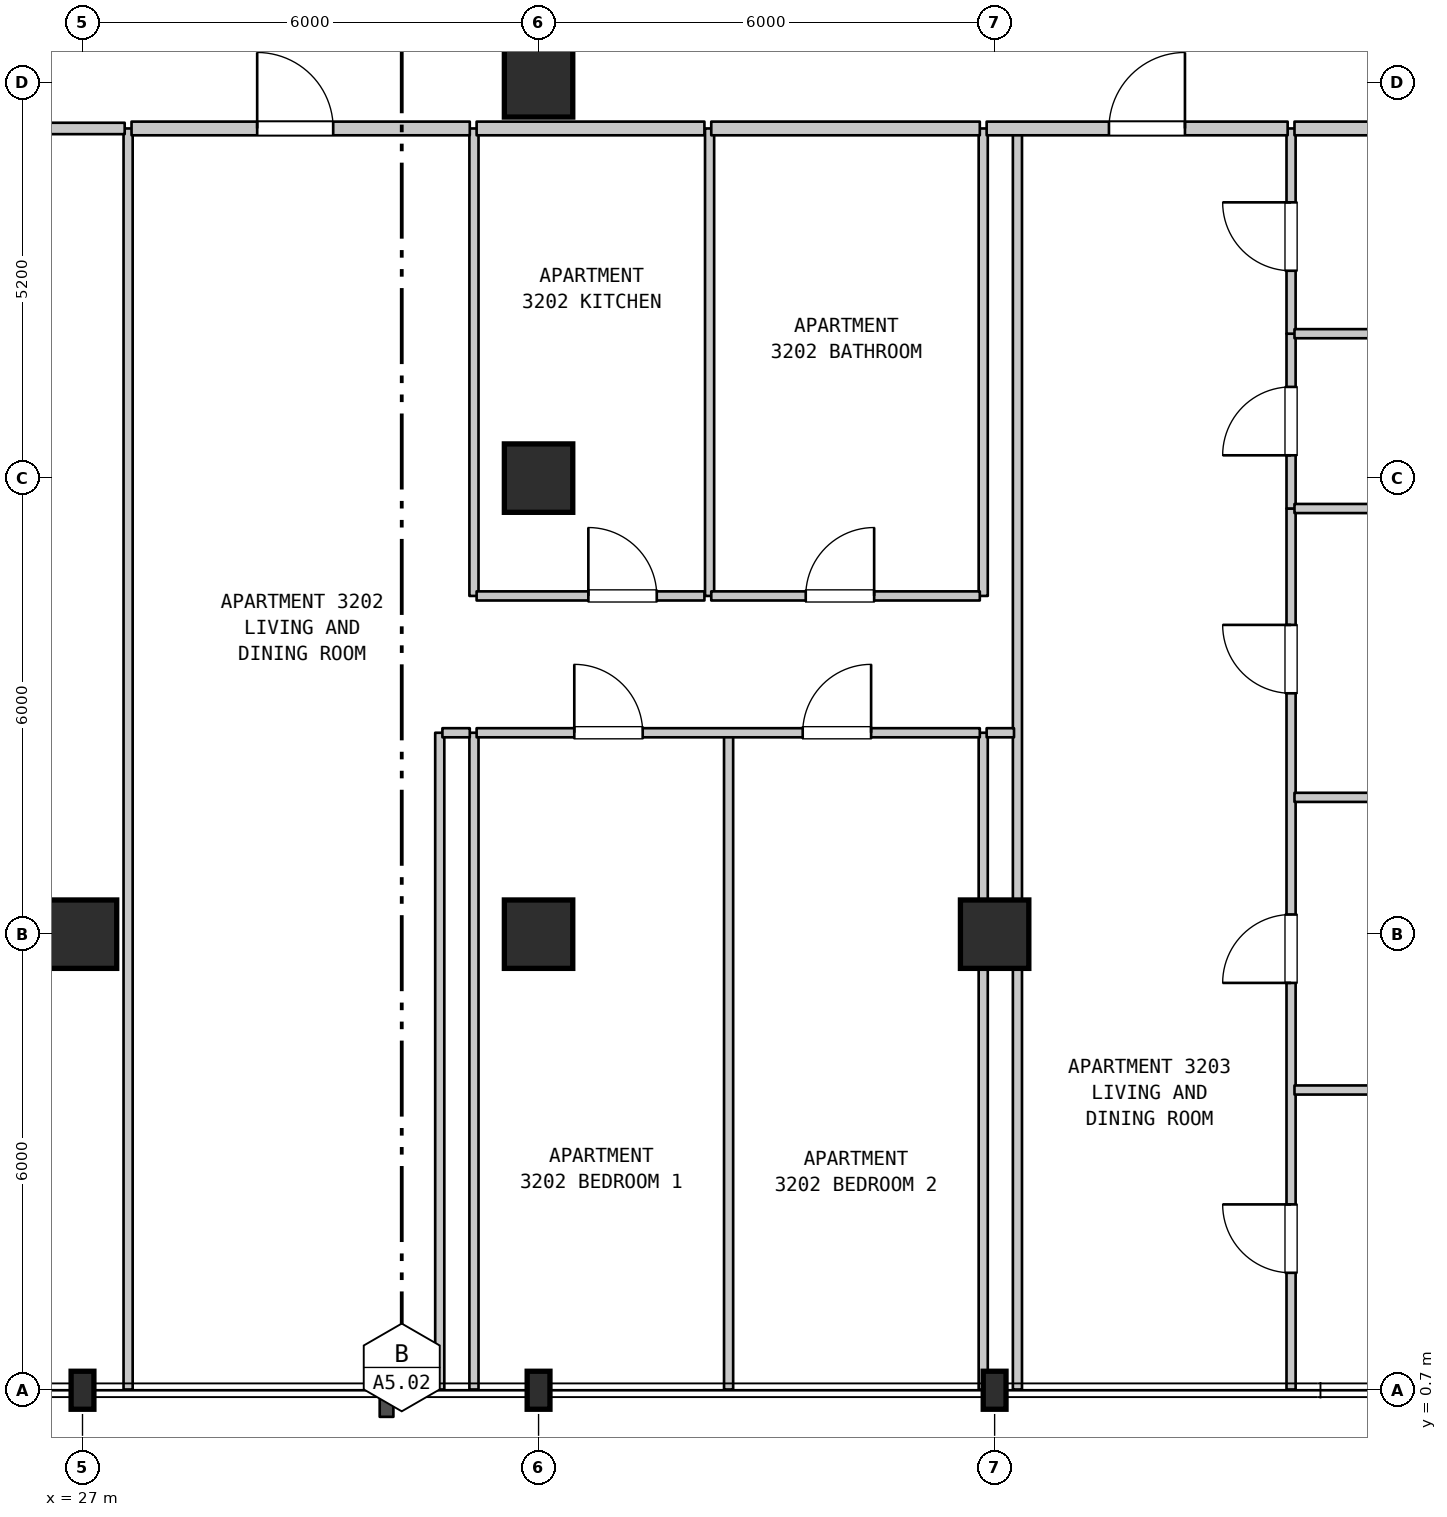
"""IFC4 building model, lengths in metres.
Left out: names, types, materials, properties, quantities, classifications, styles, units other than length and angle.
Written with IfcOpenShell. Run it as: python <this file> out.ifc"""

import sys

from ifc_helpers import new_model, si_unit, direction, frame, frame_2d, origin, origin_2d, place, context, subcontext, project, spatial, rectangle, i_section, extrude, element, fill, save


model = new_model("IFC4")
c1 = context("Model", 3, precision=1e-05, world=origin(), true_north=direction((0.0, 1.0)))
c2 = subcontext(c1, "Body", "Model", "MODEL_VIEW")
j1 = project(units=[si_unit("LENGTHUNIT", "METRE"), si_unit("PLANEANGLEUNIT", "RADIAN")], contexts=[c1])
p1 = place(None, origin())
s1 = spatial("IfcSite", under=j1, at=p1, CompositionType="ELEMENT")
p2 = place(p1, origin())
s2 = spatial("IfcBuilding", under=s1, at=p2, CompositionType="ELEMENT")
p3 = place(p2, frame((0.0, 0.0, 133.5)))
s3 = spatial("IfcBuildingStorey", under=s2, at=p3, CompositionType="ELEMENT", Elevation=133.5)
p4 = place(p3, frame((27.0, 0.7, 0.0), z_axis=(0.0, 0.0, 1.0), x_axis=(1.0, 0.0, 0.0)))
e1 = element("IfcColumn", 1, at=p4, inside=s3, PredefinedType="COLUMN", context=c2, shape_type="SweptSolid", body=[
    extrude(i_section(OverallWidth=0.3, OverallDepth=0.5, WebThickness=0.014, FlangeThickness=0.028, FilletRadius=0.027, at=origin_2d()), origin(), (0.0, 0.0, 1.0), 3.7),
])
p5 = place(p3, frame((27.0, 6.7, 0.0), z_axis=(0.0, 0.0, 1.0), x_axis=(1.0, 0.0, 0.0)))
e2 = element("IfcColumn", 2, at=p5, inside=s3, PredefinedType="COLUMN", context=c2, shape_type="SweptSolid", body=[
    extrude(rectangle(XDim=0.9, YDim=0.9, at=origin_2d()), origin(), (0.0, 0.0, 1.0), 3.7),
])
p6 = place(p3, frame((33.0, 0.7, 0.0), z_axis=(0.0, 0.0, 1.0), x_axis=(1.0, 0.0, 0.0)))
e3 = element("IfcColumn", 3, at=p6, inside=s3, PredefinedType="COLUMN", context=c2, shape_type="SweptSolid", body=[
    extrude(i_section(OverallWidth=0.3, OverallDepth=0.5, WebThickness=0.014, FlangeThickness=0.028, FilletRadius=0.027, at=origin_2d()), origin(), (0.0, 0.0, 1.0), 3.7),
])
for number, where, z_axis, x_axis in (
    (4, (33.0, 6.7, 0.0), (0.0, 0.0, 1.0), (1.0, 0.0, 0.0)),
    (5, (33.0, 12.7, 0.0), (0.0, 0.0, 1.0), (1.0, 0.0, 0.0)),
    (6, (33.0, 17.9, 0.0), (0.0, 0.0, 1.0), (1.0, 0.0, 0.0)),
):
    element("IfcColumn", number, at=place(p3, frame(where, z_axis=z_axis, x_axis=x_axis)), inside=s3, PredefinedType="COLUMN", context=c2, shape_type="SweptSolid", body=[
        extrude(rectangle(XDim=0.9, YDim=0.9, at=origin_2d()), origin(), (0.0, 0.0, 1.0), 3.7),
    ])
p7 = place(p3, frame((39.0, 0.7, 0.0), z_axis=(0.0, 0.0, 1.0), x_axis=(1.0, 0.0, 0.0)))
e7 = element("IfcColumn", 7, at=p7, inside=s3, PredefinedType="COLUMN", context=c2, shape_type="SweptSolid", body=[
    extrude(i_section(OverallWidth=0.3, OverallDepth=0.5, WebThickness=0.014, FlangeThickness=0.028, FilletRadius=0.027, at=origin_2d()), origin(), (0.0, 0.0, 1.0), 3.7),
])
p8 = place(p3, frame((39.0, 6.7, 0.0), z_axis=(0.0, 0.0, 1.0), x_axis=(1.0, 0.0, 0.0)))
e8 = element("IfcColumn", 8, at=p8, inside=s3, PredefinedType="COLUMN", context=c2, shape_type="SweptSolid", body=[
    extrude(rectangle(XDim=0.9, YDim=0.9, at=origin_2d()), origin(), (0.0, 0.0, 1.0), 3.7),
])
p9 = place(p3, frame((27.6, 0.71, 0.0), z_axis=(0.0, 0.0, 1.0), x_axis=(0.0, 1.0, 0.0)))
e9 = element("IfcWall", 9, at=p9, inside=s3, PredefinedType="PARTITIONING", context=c2, shape_type="SweptSolid", body=[
    extrude(rectangle(XDim=16.59, YDim=0.12, at=frame_2d((8.295, 0.0))), origin(), (0.0, 0.0, 1.0), 3.385),
])
for number, where, z_axis, x_axis in (
    (10, (31.7, 0.71, 0.0), (0.0, 0.0, 1.0), (0.0, 1.0, 0.0)),
    (11, (32.15, 0.71, 0.0), (0.0, 0.0, 1.0), (0.0, 1.0, 0.0)),
):
    element("IfcWall", number, at=place(p3, frame(where, z_axis=z_axis, x_axis=x_axis)), inside=s3, PredefinedType="PARTITIONING", context=c2, shape_type="SweptSolid", body=[
        extrude(rectangle(XDim=8.64, YDim=0.12, at=frame_2d((4.32, 0.0))), origin(), (0.0, 0.0, 1.0), 3.385),
    ])
for number, where, z_axis, x_axis in (
    (12, (32.15, 11.15, 0.0), (0.0, 0.0, 1.0), (0.0, 1.0, 0.0)),
    (13, (35.25, 11.15, 0.0), (0.0, 0.0, 1.0), (0.0, 1.0, 0.0)),
):
    element("IfcWall", number, at=place(p3, frame(where, z_axis=z_axis, x_axis=x_axis)), inside=s3, PredefinedType="PARTITIONING", context=c2, shape_type="SweptSolid", body=[
        extrude(rectangle(XDim=6.15, YDim=0.12, at=frame_2d((3.075, 0.0))), origin(), (0.0, 0.0, 1.0), 3.385),
    ])
for number, where, z_axis, x_axis in (
    (14, (35.5, 0.71, 0.0), (0.0, 0.0, 1.0), (0.0, 1.0, 0.0)),
    (15, (38.85, 0.71, 0.0), (0.0, 0.0, 1.0), (0.0, 1.0, 0.0)),
):
    element("IfcWall", number, at=place(p3, frame(where, z_axis=z_axis, x_axis=x_axis)), inside=s3, PredefinedType="PARTITIONING", context=c2, shape_type="SweptSolid", body=[
        extrude(rectangle(XDim=8.64, YDim=0.12, at=frame_2d((4.32, 0.0))), origin(), (0.0, 0.0, 1.0), 3.385),
    ])
p10 = place(p3, frame((38.85, 11.15, 0.0), z_axis=(0.0, 0.0, 1.0), x_axis=(0.0, 1.0, 0.0)))
e16 = element("IfcWall", 16, at=p10, inside=s3, PredefinedType="PARTITIONING", context=c2, shape_type="SweptSolid", body=[
    extrude(rectangle(XDim=6.15, YDim=0.12, at=frame_2d((3.075, 0.0))), origin(), (0.0, 0.0, 1.0), 3.385),
])
p11 = place(p3, frame((39.3, 0.71, 0.0), z_axis=(0.0, 0.0, 1.0), x_axis=(0.0, 1.0, 0.0)))
e17 = element("IfcWall", 17, at=p11, inside=s3, PredefinedType="PARTITIONING", context=c2, shape_type="SweptSolid", body=[
    extrude(rectangle(XDim=16.59, YDim=0.12, at=frame_2d((8.295, 0.0))), origin(), (0.0, 0.0, 1.0), 3.385),
])
p12 = place(p3, frame((42.9, 0.71, 0.0), z_axis=(0.0, 0.0, 1.0), x_axis=(0.0, 1.0, 0.0)))
e18 = element("IfcWall", 18, at=p12, inside=s3, PredefinedType="PARTITIONING", context=c2, shape_type="SweptSolid", body=[
    extrude(rectangle(XDim=11.59, YDim=0.12, at=frame_2d((5.795, 0.0))), origin(), (0.0, 0.0, 1.0), 3.385),
])
p13 = place(p12, frame((1.535, 0.0, 0.0)))
e19 = element("IfcOpeningElement", 19, at=p13, cuts=e18, PredefinedType="OPENING", context=c2, shape_type="SweptSolid", body=[
    extrude(rectangle(XDim=0.9, YDim=2.15, at=frame_2d((0.45, 1.075))), frame((0.0, 0.07, 0.0), z_axis=(0.0, -1.0, 0.0), x_axis=(1.0, 0.0, 0.0)), (0.0, 0.0, 1.0), 0.14),
])
p14 = place(p12, frame((5.349, 0.0, 0.0)))
e20 = element("IfcOpeningElement", 20, at=p14, cuts=e18, PredefinedType="OPENING", context=c2, shape_type="SweptSolid", body=[
    extrude(rectangle(XDim=0.9, YDim=2.15, at=frame_2d((0.45, 1.075))), frame((0.0, 0.07, 0.0), z_axis=(0.0, -1.0, 0.0), x_axis=(1.0, 0.0, 0.0)), (0.0, 0.0, 1.0), 0.14),
])
p15 = place(p12, frame((9.159, 0.0, 0.0)))
e21 = element("IfcOpeningElement", 21, at=p15, cuts=e18, PredefinedType="OPENING", context=c2, shape_type="SweptSolid", body=[
    extrude(rectangle(XDim=0.9, YDim=2.15, at=frame_2d((0.45, 1.075))), frame((0.0, 0.07, 0.0), z_axis=(0.0, -1.0, 0.0), x_axis=(1.0, 0.0, 0.0)), (0.0, 0.0, 1.0), 0.14),
])
p16 = place(p3, frame((42.9, 12.3, 0.0), z_axis=(0.0, 0.0, 1.0), x_axis=(0.0, 1.0, 0.0)))
e22 = element("IfcWall", 22, at=p16, inside=s3, PredefinedType="PARTITIONING", context=c2, shape_type="SweptSolid", body=[
    extrude(rectangle(XDim=2.3, YDim=0.12, at=frame_2d((1.15, 0.0))), origin(), (0.0, 0.0, 1.0), 3.385),
])
p17 = place(p16, frame((0.7, 0.0, 0.0)))
e23 = element("IfcOpeningElement", 23, at=p17, cuts=e22, PredefinedType="OPENING", context=c2, shape_type="SweptSolid", body=[
    extrude(rectangle(XDim=0.9, YDim=2.15, at=frame_2d((0.45, 1.075))), frame((0.0, 0.07, 0.0), z_axis=(0.0, -1.0, 0.0), x_axis=(1.0, 0.0, 0.0)), (0.0, 0.0, 1.0), 0.14),
])
p18 = place(p3, frame((42.9, 14.6, 0.0), z_axis=(0.0, 0.0, 1.0), x_axis=(0.0, 1.0, 0.0)))
e24 = element("IfcWall", 24, at=p18, inside=s3, PredefinedType="PARTITIONING", context=c2, shape_type="SweptSolid", body=[
    extrude(rectangle(XDim=2.7, YDim=0.12, at=frame_2d((1.35, 0.0))), origin(), (0.0, 0.0, 1.0), 3.385),
])
p19 = place(p18, frame((0.828, 0.0, 0.0)))
e25 = element("IfcOpeningElement", 25, at=p19, cuts=e24, PredefinedType="OPENING", context=c2, shape_type="SweptSolid", body=[
    extrude(rectangle(XDim=0.9, YDim=2.1, at=frame_2d((0.45, 1.05))), frame((0.0, 0.07, 0.0), z_axis=(0.0, -1.0, 0.0), x_axis=(1.0, 0.0, 0.0)), (0.0, 0.0, 1.0), 0.14),
])
for number, where, z_axis, x_axis in (
    (26, (42.945, 4.65, 0.0), (0.0, 0.0, 1.0), (1.0, 0.0, 0.0)),
    (27, (42.945, 8.5, 0.0), (0.0, 0.0, 1.0), (1.0, 0.0, 0.0)),
):
    element("IfcWall", number, at=place(p3, frame(where, z_axis=z_axis, x_axis=x_axis)), inside=s3, PredefinedType="PARTITIONING", context=c2, shape_type="SweptSolid", body=[
        extrude(rectangle(XDim=6.25, YDim=0.12, at=frame_2d((3.125, 0.0))), origin(), (0.0, 0.0, 1.0), 3.385),
    ])
p20 = place(p3, frame((31.735, 9.35, 0.0), z_axis=(0.0, 0.0, 1.0), x_axis=(1.0, 0.0, 0.0)))
e28 = element("IfcWall", 28, at=p20, inside=s3, PredefinedType="PARTITIONING", context=c2, shape_type="SweptSolid", body=[
    extrude(rectangle(XDim=0.36, YDim=0.12, at=frame_2d((0.18, 0.0))), origin(), (0.0, 0.0, 1.0), 3.385),
])
p21 = place(p3, frame((32.185, 9.35, 0.0), z_axis=(0.0, 0.0, 1.0), x_axis=(1.0, 0.0, 0.0)))
e29 = element("IfcWall", 29, at=p21, inside=s3, PredefinedType="PARTITIONING", context=c2, shape_type="SweptSolid", body=[
    extrude(rectangle(XDim=6.62, YDim=0.12, at=frame_2d((3.31, 0.0))), origin(), (0.0, 0.0, 1.0), 3.385),
])
p22 = place(p21, frame((1.285, 0.0, 0.0)))
e30 = element("IfcOpeningElement", 30, at=p22, cuts=e29, PredefinedType="OPENING", context=c2, shape_type="SweptSolid", body=[
    extrude(rectangle(XDim=0.9, YDim=2.15, at=frame_2d((0.45, 1.075))), frame((0.0, 0.07, 0.0), z_axis=(0.0, -1.0, 0.0), x_axis=(1.0, 0.0, 0.0)), (0.0, 0.0, 1.0), 0.14),
])
p23 = place(p21, frame((4.29, 0.0, 0.0)))
e31 = element("IfcOpeningElement", 31, at=p23, cuts=e29, PredefinedType="OPENING", context=c2, shape_type="SweptSolid", body=[
    extrude(rectangle(XDim=0.9, YDim=2.15, at=frame_2d((0.45, 1.075))), frame((0.0, 0.07, 0.0), z_axis=(0.0, -1.0, 0.0), x_axis=(1.0, 0.0, 0.0)), (0.0, 0.0, 1.0), 0.14),
])
p24 = place(p3, frame((38.895, 9.35, 0.0), z_axis=(0.0, 0.0, 1.0), x_axis=(1.0, 0.0, 0.0)))
e32 = element("IfcWall", 32, at=p24, inside=s3, PredefinedType="PARTITIONING", context=c2, shape_type="SweptSolid", body=[
    extrude(rectangle(XDim=0.36, YDim=0.12, at=frame_2d((0.18, 0.0))), origin(), (0.0, 0.0, 1.0), 3.385),
])
p25 = place(p3, frame((32.185, 11.15, 0.0), z_axis=(0.0, 0.0, 1.0), x_axis=(1.0, 0.0, 0.0)))
e33 = element("IfcWall", 33, at=p25, inside=s3, PredefinedType="PARTITIONING", context=c2, shape_type="SweptSolid", body=[
    extrude(rectangle(XDim=2.997, YDim=0.12, at=frame_2d((1.499, 0.0))), origin(), (0.0, 0.0, 1.0), 3.385),
])
p26 = place(p25, frame((1.47, 0.0, 0.0)))
e34 = element("IfcOpeningElement", 34, at=p26, cuts=e33, PredefinedType="OPENING", context=c2, shape_type="SweptSolid", body=[
    extrude(rectangle(XDim=0.9, YDim=2.15, at=frame_2d((0.45, 1.075))), frame((0.0, 0.07, 0.0), z_axis=(0.0, -1.0, 0.0), x_axis=(1.0, 0.0, 0.0)), (0.0, 0.0, 1.0), 0.14),
])
p27 = place(p3, frame((35.272, 11.15, 0.0), z_axis=(0.0, 0.0, 1.0), x_axis=(1.0, 0.0, 0.0)))
e35 = element("IfcWall", 35, at=p27, inside=s3, PredefinedType="PARTITIONING", context=c2, shape_type="SweptSolid", body=[
    extrude(rectangle(XDim=3.533, YDim=0.12, at=frame_2d((1.767, 0.0))), origin(), (0.0, 0.0, 1.0), 3.385),
])
p28 = place(p27, frame((1.243, 0.0, 0.0)))
e36 = element("IfcOpeningElement", 36, at=p28, cuts=e35, PredefinedType="OPENING", context=c2, shape_type="SweptSolid", body=[
    extrude(rectangle(XDim=0.9, YDim=2.1, at=frame_2d((0.45, 1.05))), frame((0.0, 0.07, 0.0), z_axis=(0.0, -1.0, 0.0), x_axis=(1.0, 0.0, 0.0)), (0.0, 0.0, 1.0), 0.14),
])
for number, where, z_axis, x_axis in (
    (37, (42.945, 12.3, 0.0), (0.0, 0.0, 1.0), (1.0, 0.0, 0.0)),
    (38, (42.945, 14.6, 0.0), (0.0, 0.0, 1.0), (1.0, 0.0, 0.0)),
):
    element("IfcWall", number, at=place(p3, frame(where, z_axis=z_axis, x_axis=x_axis)), inside=s3, PredefinedType="PARTITIONING", context=c2, shape_type="SweptSolid", body=[
        extrude(rectangle(XDim=6.25, YDim=0.12, at=frame_2d((3.125, 0.0))), origin(), (0.0, 0.0, 1.0), 3.385),
    ])
p29 = place(p3, frame((21.045, 17.3, 0.0), z_axis=(0.0, 0.0, 1.0), x_axis=(1.0, 0.0, 0.0)))
e39 = element("IfcWall", 39, at=p29, inside=s3, PredefinedType="STANDARD", context=c2, shape_type="SweptSolid", body=[
    extrude(rectangle(XDim=6.51, YDim=0.15, at=frame_2d((3.255, 0.0))), origin(), (0.0, 0.0, 1.0), 3.385),
])
p30 = place(p29, frame((2.755, 0.0, 0.0)))
e40 = element("IfcOpeningElement", 40, at=p30, cuts=e39, PredefinedType="OPENING", context=c2, shape_type="SweptSolid", body=[
    extrude(rectangle(XDim=1.0, YDim=2.15, at=frame_2d((0.5, 1.075))), frame((0.0, 0.085, 0.0), z_axis=(0.0, -1.0, 0.0), x_axis=(1.0, 0.0, 0.0)), (0.0, 0.0, 1.0), 0.17),
])
p31 = place(p3, frame((27.645, 17.3, 0.0), z_axis=(0.0, 0.0, 1.0), x_axis=(1.0, 0.0, 0.0)))
e41 = element("IfcWall", 41, at=p31, inside=s3, PredefinedType="STANDARD", context=c2, shape_type="SweptSolid", body=[
    extrude(rectangle(XDim=4.45, YDim=0.18, at=frame_2d((2.225, 0.0))), origin(), (0.0, 0.0, 1.0), 3.385),
])
p32 = place(p31, frame((1.653, 0.0, 0.0)))
e42 = element("IfcOpeningElement", 42, at=p32, cuts=e41, PredefinedType="OPENING", context=c2, shape_type="SweptSolid", body=[
    extrude(rectangle(XDim=1.0, YDim=2.15, at=frame_2d((0.5, 1.075))), frame((0.0, 0.1, 0.0), z_axis=(0.0, -1.0, 0.0), x_axis=(1.0, 0.0, 0.0)), (0.0, 0.0, 1.0), 0.2),
])
p33 = place(p3, frame((32.185, 17.3, 0.0), z_axis=(0.0, 0.0, 1.0), x_axis=(1.0, 0.0, 0.0)))
e43 = element("IfcWall", 43, at=p33, inside=s3, PredefinedType="STANDARD", context=c2, shape_type="SweptSolid", body=[
    extrude(rectangle(XDim=2.997, YDim=0.18, at=frame_2d((1.499, 0.0))), origin(), (0.0, 0.0, 1.0), 3.385),
])
p34 = place(p3, frame((35.272, 17.3, 0.0), z_axis=(0.0, 0.0, 1.0), x_axis=(1.0, 0.0, 0.0)))
e44 = element("IfcWall", 44, at=p34, inside=s3, PredefinedType="STANDARD", context=c2, shape_type="SweptSolid", body=[
    extrude(rectangle(XDim=3.533, YDim=0.18, at=frame_2d((1.767, 0.0))), origin(), (0.0, 0.0, 1.0), 3.385),
])
p35 = place(p3, frame((38.895, 17.3, 0.0), z_axis=(0.0, 0.0, 1.0), x_axis=(1.0, 0.0, 0.0)))
e45 = element("IfcWall", 45, at=p35, inside=s3, PredefinedType="STANDARD", context=c2, shape_type="SweptSolid", body=[
    extrude(rectangle(XDim=3.96, YDim=0.18, at=frame_2d((1.98, 0.0))), origin(), (0.0, 0.0, 1.0), 3.385),
])
p36 = place(p35, frame((1.609, 0.0, 0.0)))
e46 = element("IfcOpeningElement", 46, at=p36, cuts=e45, PredefinedType="OPENING", context=c2, shape_type="SweptSolid", body=[
    extrude(rectangle(XDim=1.0, YDim=2.15, at=frame_2d((0.5, 1.075))), frame((0.0, 0.1, 0.0), z_axis=(0.0, -1.0, 0.0), x_axis=(1.0, 0.0, 0.0)), (0.0, 0.0, 1.0), 0.2),
])
p37 = place(p3, frame((42.945, 17.3, 0.0), z_axis=(0.0, 0.0, 1.0), x_axis=(1.0, 0.0, 0.0)))
e47 = element("IfcWall", 47, at=p37, inside=s3, PredefinedType="STANDARD", context=c2, shape_type="SweptSolid", body=[
    extrude(rectangle(XDim=6.25, YDim=0.18, at=frame_2d((3.125, 0.0))), origin(), (0.0, 0.0, 1.0), 3.385),
])
p38 = place(p13, origin())
e48 = element("IfcDoor", 48, at=p38, inside=s3, OperationType="SINGLE_SWING_RIGHT", PredefinedType="DOOR", context=c2, shape_type="SweptSolid", body=[
    extrude(rectangle(XDim=0.9, YDim=2.15, at=frame_2d((0.45, 1.075))), frame((0.0, 0.025, 0.0), z_axis=(0.0, -1.0, 0.0), x_axis=(1.0, 0.0, 0.0)), (0.0, 0.0, 1.0), 0.05),
])
fill(e19, e48)
p39 = place(p14, origin())
e49 = element("IfcDoor", 49, at=p39, inside=s3, OperationType="SINGLE_SWING_LEFT", PredefinedType="DOOR", context=c2, shape_type="SweptSolid", body=[
    extrude(rectangle(XDim=0.9, YDim=2.15, at=frame_2d((0.45, 1.075))), frame((0.0, 0.025, 0.0), z_axis=(0.0, -1.0, 0.0), x_axis=(1.0, 0.0, 0.0)), (0.0, 0.0, 1.0), 0.05),
])
fill(e20, e49)
p40 = place(p15, origin())
e50 = element("IfcDoor", 50, at=p40, inside=s3, OperationType="SINGLE_SWING_RIGHT", PredefinedType="DOOR", context=c2, shape_type="SweptSolid", body=[
    extrude(rectangle(XDim=0.9, YDim=2.15, at=frame_2d((0.45, 1.075))), frame((0.0, 0.025, 0.0), z_axis=(0.0, -1.0, 0.0), x_axis=(1.0, 0.0, 0.0)), (0.0, 0.0, 1.0), 0.05),
])
fill(e21, e50)
p41 = place(p17, origin())
e51 = element("IfcDoor", 51, at=p41, inside=s3, OperationType="SINGLE_SWING_LEFT", PredefinedType="DOOR", context=c2, shape_type="SweptSolid", body=[
    extrude(rectangle(XDim=0.9, YDim=2.15, at=frame_2d((0.45, 1.075))), frame((0.0, 0.025, 0.0), z_axis=(0.0, -1.0, 0.0), x_axis=(1.0, 0.0, 0.0)), (0.0, 0.0, 1.0), 0.05),
])
fill(e23, e51)
p42 = place(p19, origin())
e52 = element("IfcDoor", 52, at=p42, inside=s3, OperationType="SINGLE_SWING_RIGHT", PredefinedType="DOOR", context=c2, shape_type="SweptSolid", body=[
    extrude(rectangle(XDim=0.9, YDim=2.1, at=frame_2d((0.45, 1.05))), frame((0.0, 0.025, 0.0), z_axis=(0.0, -1.0, 0.0), x_axis=(1.0, 0.0, 0.0)), (0.0, 0.0, 1.0), 0.05),
])
fill(e25, e52)
p43 = place(p22, origin())
e53 = element("IfcDoor", 53, at=p43, inside=s3, OperationType="SINGLE_SWING_LEFT", PredefinedType="DOOR", context=c2, shape_type="SweptSolid", body=[
    extrude(rectangle(XDim=0.9, YDim=2.15, at=frame_2d((0.45, 1.075))), frame((0.0, 0.025, 0.0), z_axis=(0.0, -1.0, 0.0), x_axis=(1.0, 0.0, 0.0)), (0.0, 0.0, 1.0), 0.05),
])
fill(e30, e53)
p44 = place(p23, origin())
e54 = element("IfcDoor", 54, at=p44, inside=s3, OperationType="SINGLE_SWING_RIGHT", PredefinedType="DOOR", context=c2, shape_type="SweptSolid", body=[
    extrude(rectangle(XDim=0.9, YDim=2.15, at=frame_2d((0.45, 1.075))), frame((0.0, 0.025, 0.0), z_axis=(0.0, -1.0, 0.0), x_axis=(1.0, 0.0, 0.0)), (0.0, 0.0, 1.0), 0.05),
])
fill(e31, e54)
p45 = place(p26, origin())
e55 = element("IfcDoor", 55, at=p45, inside=s3, OperationType="SINGLE_SWING_LEFT", PredefinedType="DOOR", context=c2, shape_type="SweptSolid", body=[
    extrude(rectangle(XDim=0.9, YDim=2.15, at=frame_2d((0.45, 1.075))), frame((0.0, 0.025, 0.0), z_axis=(0.0, -1.0, 0.0), x_axis=(1.0, 0.0, 0.0)), (0.0, 0.0, 1.0), 0.05),
])
fill(e34, e55)
p46 = place(p28, origin())
e56 = element("IfcDoor", 56, at=p46, inside=s3, OperationType="SINGLE_SWING_RIGHT", PredefinedType="DOOR", context=c2, shape_type="SweptSolid", body=[
    extrude(rectangle(XDim=0.9, YDim=2.1, at=frame_2d((0.45, 1.05))), frame((0.0, 0.025, 0.0), z_axis=(0.0, -1.0, 0.0), x_axis=(1.0, 0.0, 0.0)), (0.0, 0.0, 1.0), 0.05),
])
fill(e36, e56)
p47 = place(p32, origin())
e57 = element("IfcDoor", 57, at=p47, inside=s3, OperationType="SINGLE_SWING_LEFT", PredefinedType="DOOR", context=c2, shape_type="SweptSolid", body=[
    extrude(rectangle(XDim=1.0, YDim=2.15, at=frame_2d((0.5, 1.075))), frame((0.0, 0.025, 0.0), z_axis=(0.0, -1.0, 0.0), x_axis=(1.0, 0.0, 0.0)), (0.0, 0.0, 1.0), 0.05),
])
fill(e42, e57)
p48 = place(p36, origin())
e58 = element("IfcDoor", 58, at=p48, inside=s3, OperationType="SINGLE_SWING_RIGHT", PredefinedType="DOOR", context=c2, shape_type="SweptSolid", body=[
    extrude(rectangle(XDim=1.0, YDim=2.15, at=frame_2d((0.5, 1.075))), frame((0.0, 0.025, 0.0), z_axis=(0.0, -1.0, 0.0), x_axis=(1.0, 0.0, 0.0)), (0.0, 0.0, 1.0), 0.05),
])
fill(e46, e58)
save(model, sys.argv[1])
